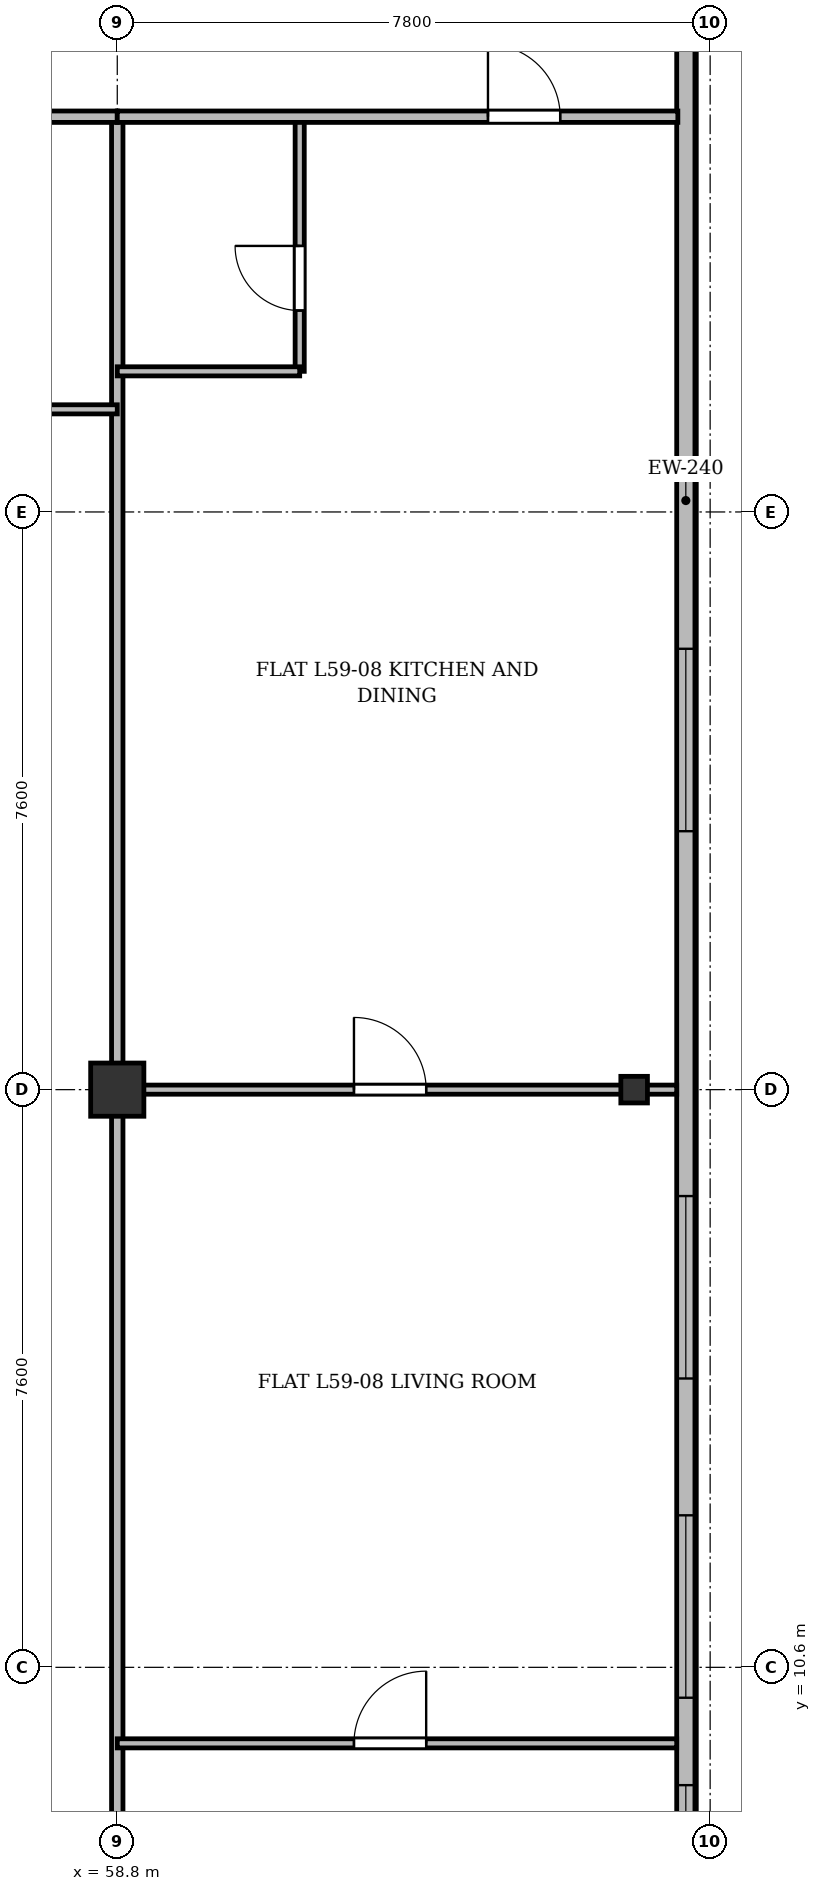
"""IFC4 building model, lengths in metres.
Left out: names, types, materials, properties, quantities, classifications, styles, units other than length and angle.
Written with IfcOpenShell. Run it as: python <this file> out.ifc"""

import sys

from ifc_helpers import new_model, si_unit, direction, frame, frame_2d, origin, origin_2d, place, context, subcontext, project, spatial, rectangle, i_section, extrude, source, transform, mapped, element, fill, save


model = new_model("IFC4")
c1 = context("Model", 3, precision=1e-05, world=origin(), true_north=direction((0.0, 1.0)))
c2 = subcontext(c1, "Body", "Model", "MODEL_VIEW")
j1 = project(units=[si_unit("LENGTHUNIT", "METRE"), si_unit("PLANEANGLEUNIT", "RADIAN")], contexts=[c1])
p1 = place(None, origin())
s1 = spatial("IfcSite", under=j1, at=p1, CompositionType="ELEMENT")
p2 = place(p1, origin())
s2 = spatial("IfcBuilding", under=s1, at=p2, CompositionType="ELEMENT")
p3 = place(p2, frame((0.0, 0.0, 226.5)))
s3 = spatial("IfcBuildingStorey", under=s2, at=p3, CompositionType="ELEMENT", Elevation=226.5)
m1 = source(origin(), c2, "Body", "SweptSolid", [
    extrude(rectangle(XDim=0.7, YDim=0.7, at=origin_2d()), origin(), (0.0, 0.0, 1.0), 3.6),
])
p4 = place(p3, frame((58.8, 18.2, 0.0), z_axis=(0.0, 0.0, 1.0), x_axis=(1.0, 0.0, 0.0)))
e1 = element("IfcColumn", 1, at=p4, inside=s3, PredefinedType="COLUMN", context=c2, shape_type="MappedRepresentation", body=[
    mapped(m1, transform((0.0, 0.0, 0.0), x_axis=(1.0, 0.0, 0.0), y_axis=(0.0, 1.0, 0.0), z_axis=(0.0, 0.0, 1.0), scale=1.0)),
])
m2 = source(origin(), c2, "Body", "SweptSolid", [
    extrude(i_section(OverallWidth=0.35, OverallDepth=0.35, WebThickness=0.018, FlangeThickness=0.028, at=origin_2d()), origin(), (0.0, 0.0, 1.0), 3.6),
])
p5 = place(p3, frame((65.6, 18.2, 0.0), z_axis=(0.0, 0.0, 1.0), x_axis=(1.0, 0.0, 0.0)))
e2 = element("IfcColumn", 2, at=p5, inside=s3, PredefinedType="COLUMN", context=c2, shape_type="MappedRepresentation", body=[
    mapped(m2, transform((0.0, 0.0, 0.0), x_axis=(1.0, 0.0, 0.0), y_axis=(0.0, 1.0, 0.0), z_axis=(0.0, 0.0, 1.0), scale=1.0)),
])
p6 = place(p3, frame((66.28, 45.5, 0.0), z_axis=(0.0, 0.0, 1.0), x_axis=(0.0, -1.0, 0.0)))
e3 = element("IfcWall", 3, at=p6, inside=s3, PredefinedType="SOLIDWALL", context=c2, shape_type="SweptSolid", body=[
    extrude(rectangle(XDim=39.1, YDim=0.24, at=frame_2d((19.55, 0.0))), origin(), (0.0, 0.0, 1.0), 3.36),
])
p7 = place(p6, frame((36.45, 0.0, 0.92)))
e4 = element("IfcOpeningElement", 4, at=p7, cuts=e3, PredefinedType="OPENING", context=c2, shape_type="SweptSolid", body=[
    extrude(rectangle(XDim=1.2, YDim=1.65, at=frame_2d((0.6, 0.825))), frame((0.0, 0.13, 0.0), z_axis=(0.0, -1.0, 0.0), x_axis=(1.0, 0.0, 0.0)), (0.0, 0.0, 1.0), 0.26),
])
p8 = place(p6, frame((32.9, 0.0, 0.92)))
e5 = element("IfcOpeningElement", 5, at=p8, cuts=e3, PredefinedType="OPENING", context=c2, shape_type="SweptSolid", body=[
    extrude(rectangle(XDim=2.4, YDim=2.1, at=frame_2d((1.2, 1.05))), frame((0.0, 0.13, 0.0), z_axis=(0.0, -1.0, 0.0), x_axis=(1.0, 0.0, 0.0)), (0.0, 0.0, 1.0), 0.26),
])
p9 = place(p6, frame((28.7, 0.0, 0.92)))
e6 = element("IfcOpeningElement", 6, at=p9, cuts=e3, PredefinedType="OPENING", context=c2, shape_type="SweptSolid", body=[
    extrude(rectangle(XDim=2.4, YDim=2.1, at=frame_2d((1.2, 1.05))), frame((0.0, 0.13, 0.0), z_axis=(0.0, -1.0, 0.0), x_axis=(1.0, 0.0, 0.0)), (0.0, 0.0, 1.0), 0.26),
])
p10 = place(p6, frame((21.5, 0.0, 0.92)))
e7 = element("IfcOpeningElement", 7, at=p10, cuts=e3, PredefinedType="OPENING", context=c2, shape_type="SweptSolid", body=[
    extrude(rectangle(XDim=2.4, YDim=2.1, at=frame_2d((1.2, 1.05))), frame((0.0, 0.13, 0.0), z_axis=(0.0, -1.0, 0.0), x_axis=(1.0, 0.0, 0.0)), (0.0, 0.0, 1.0), 0.26),
])
p11 = place(p6, frame((7.5, 0.0, 0.92)))
e8 = element("IfcOpeningElement", 8, at=p11, cuts=e3, PredefinedType="OPENING", context=c2, shape_type="SweptSolid", body=[
    extrude(rectangle(XDim=2.4, YDim=2.1, at=frame_2d((1.2, 1.05))), frame((0.0, 0.13, 0.0), z_axis=(0.0, -1.0, 0.0), x_axis=(1.0, 0.0, 0.0)), (0.0, 0.0, 1.0), 0.26),
])
p12 = place(p6, frame((4.5, 0.0, 0.92)))
e9 = element("IfcOpeningElement", 9, at=p12, cuts=e3, PredefinedType="OPENING", context=c2, shape_type="SweptSolid", body=[
    extrude(rectangle(XDim=1.2, YDim=1.65, at=frame_2d((0.6, 0.825))), frame((0.0, 0.13, 0.0), z_axis=(0.0, -1.0, 0.0), x_axis=(1.0, 0.0, 0.0)), (0.0, 0.0, 1.0), 0.26),
])
p13 = place(p6, frame((1.15, 0.0, 0.92)))
e10 = element("IfcOpeningElement", 10, at=p13, cuts=e3, PredefinedType="OPENING", context=c2, shape_type="SweptSolid", body=[
    extrude(rectangle(XDim=1.2, YDim=1.65, at=frame_2d((0.6, 0.825))), frame((0.0, 0.13, 0.0), z_axis=(0.0, -1.0, 0.0), x_axis=(1.0, 0.0, 0.0)), (0.0, 0.0, 1.0), 0.26),
])
p14 = place(p3, frame((58.8, 3.625, 0.0), z_axis=(0.0, 0.0, 1.0), x_axis=(0.0, 1.0, 0.0)))
e11 = element("IfcWall", 11, at=p14, inside=s3, PredefinedType="PARTITIONING", context=c2, shape_type="SweptSolid", body=[
    extrude(rectangle(XDim=27.375, YDim=0.15, at=frame_2d((13.688, 0.0))), origin(), (0.0, 0.0, 1.0), 2.86),
])
p15 = place(p3, frame((51.0, 31.0, 0.0), z_axis=(0.0, 0.0, 1.0), x_axis=(1.0, 0.0, 0.0)))
e12 = element("IfcWall", 12, at=p15, inside=s3, PredefinedType="PARTITIONING", context=c2, shape_type="SweptSolid", body=[
    extrude(rectangle(XDim=7.8, YDim=0.15, at=frame_2d((3.9, 0.0))), origin(), (0.0, 0.0, 1.0), 2.86),
])
p16 = place(p15, frame((3.333, 0.0, 0.0)))
e13 = element("IfcOpeningElement", 13, at=p16, cuts=e12, PredefinedType="OPENING", context=c2, shape_type="SweptSolid", body=[
    extrude(rectangle(XDim=0.95, YDim=2.15, at=frame_2d((0.475, 1.075))), frame((0.0, 0.085, 0.0), z_axis=(0.0, -1.0, 0.0), x_axis=(1.0, 0.0, 0.0)), (0.0, 0.0, 1.0), 0.17),
])
p17 = place(p3, frame((51.0, 27.15, 0.0), z_axis=(0.0, 0.0, 1.0), x_axis=(1.0, 0.0, 0.0)))
e14 = element("IfcWall", 14, at=p17, inside=s3, PredefinedType="PARTITIONING", context=c2, shape_type="SweptSolid", body=[
    extrude(rectangle(XDim=7.8, YDim=0.12, at=frame_2d((3.9, 0.0))), origin(), (0.0, 0.0, 1.0), 2.86),
])
p18 = place(p17, frame((3.333, 0.0, 0.0)))
e15 = element("IfcOpeningElement", 15, at=p18, cuts=e14, PredefinedType="OPENING", context=c2, shape_type="SweptSolid", body=[
    extrude(rectangle(XDim=0.95, YDim=2.15, at=frame_2d((0.475, 1.075))), frame((0.0, 0.07, 0.0), z_axis=(0.0, -1.0, 0.0), x_axis=(1.0, 0.0, 0.0)), (0.0, 0.0, 1.0), 0.14),
])
p19 = place(p3, frame((58.8, 18.2, 0.0), z_axis=(0.0, 0.0, 1.0), x_axis=(1.0, 0.0, 0.0)))
e16 = element("IfcWall", 16, at=p19, inside=s3, PredefinedType="PARTITIONING", context=c2, shape_type="SweptSolid", body=[
    extrude(rectangle(XDim=7.36, YDim=0.12, at=frame_2d((3.68, 0.0))), origin(), (0.0, 0.0, 1.0), 2.91),
])
p20 = place(p19, frame((3.114, 0.0, 0.0)))
e17 = element("IfcOpeningElement", 17, at=p20, cuts=e16, PredefinedType="OPENING", context=c2, shape_type="SweptSolid", body=[
    extrude(rectangle(XDim=0.95, YDim=2.15, at=frame_2d((0.475, 1.075))), frame((0.0, 0.07, 0.0), z_axis=(0.0, -1.0, 0.0), x_axis=(1.0, 0.0, 0.0)), (0.0, 0.0, 1.0), 0.14),
])
p21 = place(p3, frame((61.2, 27.65, 0.0), z_axis=(0.0, 0.0, 1.0), x_axis=(0.0, 1.0, 0.0)))
e18 = element("IfcWall", 18, at=p21, inside=s3, PredefinedType="PARTITIONING", context=c2, shape_type="SweptSolid", body=[
    extrude(rectangle(XDim=3.35, YDim=0.12, at=frame_2d((1.675, 0.0))), origin(), (0.0, 0.0, 1.0), 3.36),
])
p22 = place(p21, frame((0.8, 0.0, 0.0)))
e19 = element("IfcOpeningElement", 19, at=p22, cuts=e18, PredefinedType="OPENING", context=c2, shape_type="SweptSolid", body=[
    extrude(rectangle(XDim=0.85, YDim=2.1, at=frame_2d((0.425, 1.05))), frame((0.0, 0.07, 0.0), z_axis=(0.0, -1.0, 0.0), x_axis=(1.0, 0.0, 0.0)), (0.0, 0.0, 1.0), 0.14),
])
p23 = place(p3, frame((58.8, 27.65, 0.0), z_axis=(0.0, 0.0, 1.0), x_axis=(1.0, 0.0, 0.0)))
e20 = element("IfcWall", 20, at=p23, inside=s3, PredefinedType="PARTITIONING", context=c2, shape_type="SweptSolid", body=[
    extrude(rectangle(XDim=2.4, YDim=0.12, at=frame_2d((1.2, 0.0))), origin(), (0.0, 0.0, 1.0), 2.86),
])
p24 = place(p3, frame((58.8, 31.0, 0.0), z_axis=(0.0, 0.0, 1.0), x_axis=(1.0, 0.0, 0.0)))
e21 = element("IfcWall", 21, at=p24, inside=s3, PredefinedType="PARTITIONING", context=c2, shape_type="SweptSolid", body=[
    extrude(rectangle(XDim=7.375, YDim=0.15, at=frame_2d((3.688, 0.0))), origin(), (0.0, 0.0, 1.0), 2.86),
])
p25 = place(p24, frame((4.877, 0.0, 0.0)))
e22 = element("IfcOpeningElement", 22, at=p25, cuts=e21, PredefinedType="OPENING", context=c2, shape_type="SweptSolid", body=[
    extrude(rectangle(XDim=0.95, YDim=2.15, at=frame_2d((0.475, 1.075))), frame((0.0, 0.085, 0.0), z_axis=(0.0, -1.0, 0.0), x_axis=(1.0, 0.0, 0.0)), (0.0, 0.0, 1.0), 0.17),
])
p26 = place(p3, frame((58.8, 9.6, 0.0), z_axis=(0.0, 0.0, 1.0), x_axis=(1.0, 0.0, 0.0)))
e23 = element("IfcWall", 23, at=p26, inside=s3, PredefinedType="PARTITIONING", context=c2, shape_type="SweptSolid", body=[
    extrude(rectangle(XDim=7.36, YDim=0.12, at=frame_2d((3.68, 0.0))), origin(), (0.0, 0.0, 1.0), 2.86),
])
p27 = place(p26, frame((3.114, 0.0, 0.0)))
e24 = element("IfcOpeningElement", 24, at=p27, cuts=e23, PredefinedType="OPENING", context=c2, shape_type="SweptSolid", body=[
    extrude(rectangle(XDim=0.95, YDim=2.15, at=frame_2d((0.475, 1.075))), frame((0.0, 0.07, 0.0), z_axis=(0.0, -1.0, 0.0), x_axis=(1.0, 0.0, 0.0)), (0.0, 0.0, 1.0), 0.14),
])
m3 = source(origin(), c2, "Body", "SweptSolid", [
    extrude(rectangle(XDim=1.2, YDim=1.65, at=frame_2d((0.6, 0.825))), frame((0.0, 0.03, 0.0), z_axis=(0.0, -1.0, 0.0), x_axis=(1.0, 0.0, 0.0)), (0.0, 0.0, 1.0), 0.06),
])
p28 = place(p7, origin())
e25 = element("IfcWindow", 25, at=p28, inside=s3, PartitioningType="SINGLE_PANEL", PredefinedType="WINDOW", context=c2, shape_type="MappedRepresentation", body=[
    mapped(m3, transform((0.0, 0.0, 0.0), x_axis=(1.0, 0.0, 0.0), y_axis=(0.0, 1.0, 0.0), z_axis=(0.0, 0.0, 1.0), scale=1.0)),
])
fill(e4, e25)
m4 = source(origin(), c2, "Body", "SweptSolid", [
    extrude(rectangle(XDim=2.4, YDim=2.1, at=frame_2d((1.2, 1.05))), frame((0.0, 0.03, 0.0), z_axis=(0.0, -1.0, 0.0), x_axis=(1.0, 0.0, 0.0)), (0.0, 0.0, 1.0), 0.06),
])
p29 = place(p8, origin())
e26 = element("IfcWindow", 26, at=p29, inside=s3, PartitioningType="SINGLE_PANEL", PredefinedType="WINDOW", context=c2, shape_type="MappedRepresentation", body=[
    mapped(m4, transform((0.0, 0.0, 0.0), x_axis=(1.0, 0.0, 0.0), y_axis=(0.0, 1.0, 0.0), z_axis=(0.0, 0.0, 1.0), scale=1.0)),
])
fill(e5, e26)
p30 = place(p9, origin())
e27 = element("IfcWindow", 27, at=p30, inside=s3, PartitioningType="SINGLE_PANEL", PredefinedType="WINDOW", context=c2, shape_type="MappedRepresentation", body=[
    mapped(m4, transform((0.0, 0.0, 0.0), x_axis=(1.0, 0.0, 0.0), y_axis=(0.0, 1.0, 0.0), z_axis=(0.0, 0.0, 1.0), scale=1.0)),
])
fill(e6, e27)
p31 = place(p10, origin())
e28 = element("IfcWindow", 28, at=p31, inside=s3, PartitioningType="SINGLE_PANEL", PredefinedType="WINDOW", context=c2, shape_type="MappedRepresentation", body=[
    mapped(m4, transform((0.0, 0.0, 0.0), x_axis=(1.0, 0.0, 0.0), y_axis=(0.0, 1.0, 0.0), z_axis=(0.0, 0.0, 1.0), scale=1.0)),
])
fill(e7, e28)
m5 = source(origin(), c2, "Body", "SweptSolid", [
    extrude(rectangle(XDim=0.95, YDim=2.15, at=frame_2d((0.475, 1.075))), frame((0.0, 0.025, 0.0), z_axis=(0.0, -1.0, 0.0), x_axis=(1.0, 0.0, 0.0)), (0.0, 0.0, 1.0), 0.05),
])
p32 = place(p20, origin())
e29 = element("IfcDoor", 29, at=p32, inside=s3, OperationType="SINGLE_SWING_LEFT", PredefinedType="DOOR", context=c2, shape_type="MappedRepresentation", body=[
    mapped(m5, transform((0.0, 0.0, 0.0), x_axis=(1.0, 0.0, 0.0), y_axis=(0.0, 1.0, 0.0), z_axis=(0.0, 0.0, 1.0), scale=1.0)),
])
fill(e17, e29)
m6 = source(origin(), c2, "Body", "SweptSolid", [
    extrude(rectangle(XDim=0.85, YDim=2.1, at=frame_2d((0.425, 1.05))), frame((0.0, 0.025, 0.0), z_axis=(0.0, -1.0, 0.0), x_axis=(1.0, 0.0, 0.0)), (0.0, 0.0, 1.0), 0.05),
])
p33 = place(p22, origin())
e30 = element("IfcDoor", 30, at=p33, inside=s3, OperationType="SINGLE_SWING_RIGHT", PredefinedType="DOOR", context=c2, shape_type="MappedRepresentation", body=[
    mapped(m6, transform((0.0, 0.0, 0.0), x_axis=(1.0, 0.0, 0.0), y_axis=(0.0, 1.0, 0.0), z_axis=(0.0, 0.0, 1.0), scale=1.0)),
])
fill(e19, e30)
p34 = place(p25, origin())
e31 = element("IfcDoor", 31, at=p34, inside=s3, OperationType="SINGLE_SWING_LEFT", PredefinedType="DOOR", context=c2, shape_type="MappedRepresentation", body=[
    mapped(m5, transform((0.0, 0.0, 0.0), x_axis=(1.0, 0.0, 0.0), y_axis=(0.0, 1.0, 0.0), z_axis=(0.0, 0.0, 1.0), scale=1.0)),
])
fill(e22, e31)
p35 = place(p27, origin())
e32 = element("IfcDoor", 32, at=p35, inside=s3, OperationType="SINGLE_SWING_RIGHT", PredefinedType="DOOR", context=c2, shape_type="MappedRepresentation", body=[
    mapped(m5, transform((0.0, 0.0, 0.0), x_axis=(1.0, 0.0, 0.0), y_axis=(0.0, 1.0, 0.0), z_axis=(0.0, 0.0, 1.0), scale=1.0)),
])
fill(e24, e32)
save(model, sys.argv[1])
